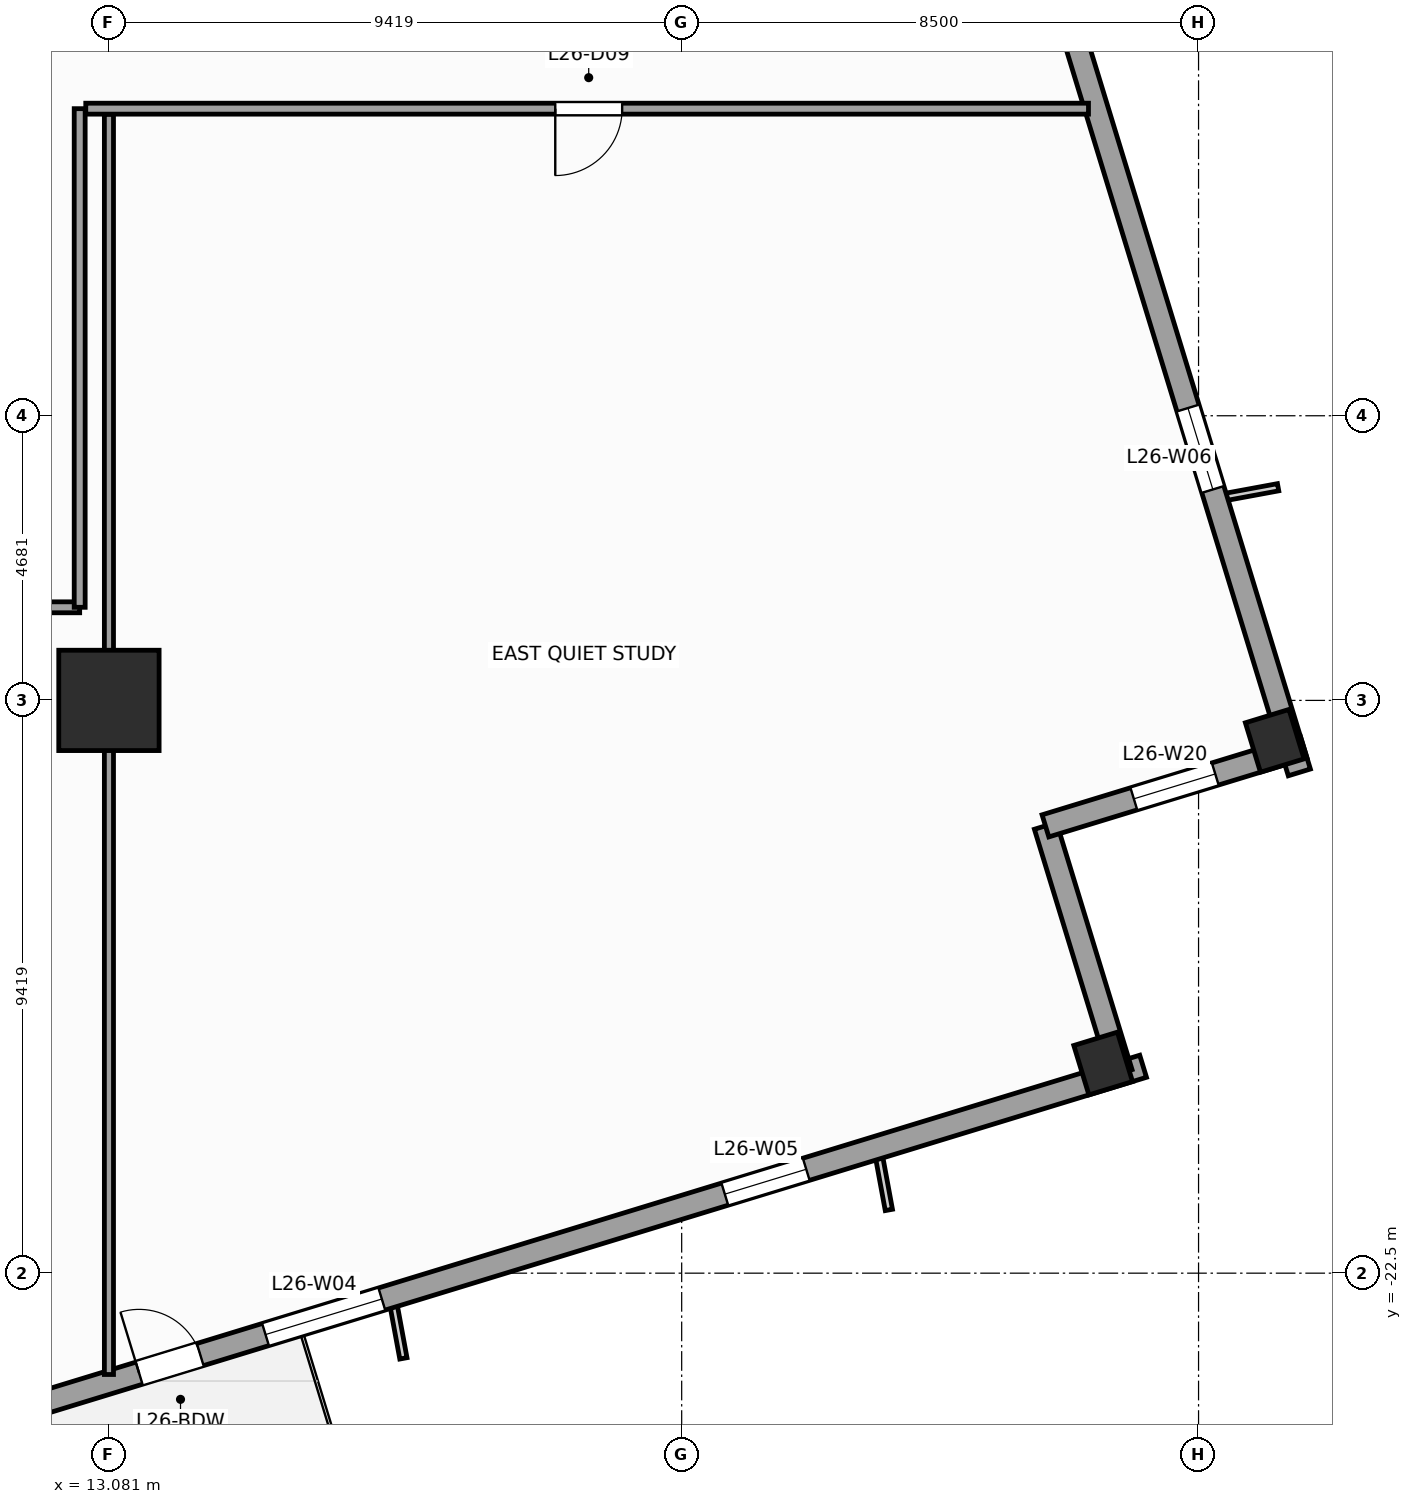
"""IFC4 building model, lengths in metres.
Left out: names, types, materials, properties, quantities, classifications, styles, units other than length and angle.
Written with IfcOpenShell. Run it as: python <this file> out.ifc"""

import sys

from ifc_helpers import new_model, si_unit, direction, frame, frame_2d, origin, origin_2d, place, context, subcontext, project, spatial, rectangle, extrude, source, transform, mapped, element, fill, save


model = new_model("IFC4")
c1 = context("Model", 3, precision=1e-05, world=origin(), true_north=direction((0.0, 1.0)))
c2 = subcontext(c1, "Body", "Model", "MODEL_VIEW")
j1 = project(units=[si_unit("LENGTHUNIT", "METRE"), si_unit("PLANEANGLEUNIT", "RADIAN")], contexts=[c1])
p1 = place(None, origin())
s1 = spatial("IfcSite", under=j1, at=p1, CompositionType="ELEMENT")
p2 = place(p1, origin())
s2 = spatial("IfcBuilding", under=s1, at=p2, CompositionType="ELEMENT")
p3 = place(p2, frame((0.0, 0.0, 111.2)))
s3 = spatial("IfcBuildingStorey", under=s2, at=p3, CompositionType="ELEMENT", Elevation=111.2)
m1 = source(origin(), c2, "Body", "SweptSolid", [
    extrude(rectangle(XDim=1.65, YDim=1.65, at=origin_2d()), origin(), (0.0, 0.0, 1.0), 4.0),
])
p4 = place(p3, frame((13.081, -13.081, 0.0), z_axis=(0.0, 0.0, 1.0), x_axis=(1.0, 0.0, 0.0)))
e1 = element("IfcColumn", 1, at=p4, inside=s3, PredefinedType="COLUMN", context=c2, shape_type="MappedRepresentation", body=[
    mapped(m1, transform((0.0, 0.0, 0.0), scale=1.0)),
])
m2 = source(origin(), c2, "Body", "SweptSolid", [
    extrude(rectangle(XDim=0.75, YDim=0.85, at=origin_2d()), origin(), (0.0, 0.0, 1.0), 4.0),
])
for number, where, z_axis, x_axis in (
    (2, (29.431, -19.052, 0.0), (0.0, 0.0, 1.0), (0.956, 0.292, 0.0)),
    (3, (32.253, -13.746, 0.0), (0.0, 0.0, 1.0), (0.956, 0.292, 0.0)),
):
    element("IfcColumn", number, at=place(p3, frame(where, z_axis=z_axis, x_axis=x_axis)), inside=s3, PredefinedType="COLUMN", context=c2, shape_type="MappedRepresentation", body=[
        mapped(m2, transform((0.0, 0.0, 0.0), scale=1.0)),
    ])
p5 = place(p3, frame((-14.265, -32.658, 0.0), z_axis=(0.0, 0.0, 1.0), x_axis=(0.956304320851, 0.292373127906, 0.0)))
e4 = element("IfcWall", 4, at=p5, inside=s3, PredefinedType="STANDARD", context=c2, shape_type="SweptSolid", body=[
    extrude(rectangle(XDim=46.38, YDim=0.38, at=frame_2d((23.19, 0.0))), origin(), (0.0, 0.0, 1.0), 3.14),
])
p6 = place(p5, frame((29.115, 0.0, 0.0)))
e5 = element("IfcOpeningElement", 5, at=p6, cuts=e4, PredefinedType="OPENING", context=c2, shape_type="SweptSolid", body=[
    extrude(rectangle(XDim=1.05, YDim=2.25, at=frame_2d((0.525, 1.125))), frame((0.0, 0.2, 0.0), z_axis=(0.0, -1.0, 0.0), x_axis=(1.0, 0.0, 0.0)), (0.0, 0.0, 1.0), 0.4),
])
p7 = place(p5, frame((4.865, 0.0, 0.51)))
e6 = element("IfcOpeningElement", 6, at=p7, cuts=e4, PredefinedType="OPENING", context=c2, shape_type="SweptSolid", body=[
    extrude(rectangle(XDim=1.4, YDim=2.4, at=frame_2d((0.7, 1.2))), frame((0.0, 0.2, 0.0), z_axis=(0.0, -1.0, 0.0), x_axis=(1.0, 0.0, 0.0)), (0.0, 0.0, 1.0), 0.4),
])
p8 = place(p5, frame((10.95, 0.0, 0.51)))
e7 = element("IfcOpeningElement", 7, at=p8, cuts=e4, PredefinedType="OPENING", context=c2, shape_type="SweptSolid", body=[
    extrude(rectangle(XDim=2.0, YDim=2.4, at=frame_2d((1.0, 1.2))), frame((0.0, 0.2, 0.0), z_axis=(0.0, -1.0, 0.0), x_axis=(1.0, 0.0, 0.0)), (0.0, 0.0, 1.0), 0.4),
])
p9 = place(p5, frame((20.512, 0.0, 0.51)))
e8 = element("IfcOpeningElement", 8, at=p9, cuts=e4, PredefinedType="OPENING", context=c2, shape_type="SweptSolid", body=[
    extrude(rectangle(XDim=2.0, YDim=2.4, at=frame_2d((1.0, 1.2))), frame((0.0, 0.2, 0.0), z_axis=(0.0, -1.0, 0.0), x_axis=(1.0, 0.0, 0.0)), (0.0, 0.0, 1.0), 0.4),
])
p10 = place(p5, frame((31.288, 0.0, 0.51)))
e9 = element("IfcOpeningElement", 9, at=p10, cuts=e4, PredefinedType="OPENING", context=c2, shape_type="SweptSolid", body=[
    extrude(rectangle(XDim=2.0, YDim=2.4, at=frame_2d((1.0, 1.2))), frame((0.0, 0.2, 0.0), z_axis=(0.0, -1.0, 0.0), x_axis=(1.0, 0.0, 0.0)), (0.0, 0.0, 1.0), 0.4),
])
p11 = place(p5, frame((39.187, 0.0, 0.51)))
e10 = element("IfcOpeningElement", 10, at=p11, cuts=e4, PredefinedType="OPENING", context=c2, shape_type="SweptSolid", body=[
    extrude(rectangle(XDim=1.4, YDim=2.4, at=frame_2d((0.7, 1.2))), frame((0.0, 0.2, 0.0), z_axis=(0.0, -1.0, 0.0), x_axis=(1.0, 0.0, 0.0)), (0.0, 0.0, 1.0), 0.4),
])
p12 = place(p3, frame((29.725, -19.208, 0.0), z_axis=(0.0, 0.0, 1.0), x_axis=(-0.292345507338, 0.956312764915, 0.0)))
e11 = element("IfcWall", 11, at=p12, inside=s3, PredefinedType="STANDARD", context=c2, shape_type="SweptSolid", body=[
    extrude(rectangle(XDim=4.25, YDim=0.38, at=frame_2d((2.125, 0.0))), origin(), (0.0, 0.0, 1.0), 3.74),
])
p13 = place(p3, frame((28.482, -15.144, 0.0), z_axis=(0.0, 0.0, 1.0), x_axis=(0.956304176051, 0.292373601522, 0.0)))
e12 = element("IfcWall", 12, at=p13, inside=s3, PredefinedType="STANDARD", context=c2, shape_type="SweptSolid", body=[
    extrude(rectangle(XDim=4.44, YDim=0.38, at=frame_2d((2.22, 0.0))), origin(), (0.0, 0.0, 1.0), 3.04),
])
p14 = place(p13, frame((1.52, 0.0, 0.51)))
e13 = element("IfcOpeningElement", 13, at=p14, cuts=e12, PredefinedType="OPENING", context=c2, shape_type="SweptSolid", body=[
    extrude(rectangle(XDim=1.4, YDim=2.4, at=frame_2d((0.7, 1.2))), frame((0.0, 0.2, 0.0), z_axis=(0.0, -1.0, 0.0), x_axis=(1.0, 0.0, 0.0)), (0.0, 0.0, 1.0), 0.4),
])
p15 = place(p3, frame((32.658, -14.265, 0.0), z_axis=(0.0, 0.0, 1.0), x_axis=(-0.292373127906, 0.956304320851, 0.0)))
e14 = element("IfcWall", 14, at=p15, inside=s3, PredefinedType="STANDARD", context=c2, shape_type="SweptSolid", body=[
    extrude(rectangle(XDim=46.38, YDim=0.38, at=frame_2d((23.19, 0.0))), origin(), (0.0, 0.0, 1.0), 3.14),
])
p16 = place(p15, frame((4.865, 0.0, 0.51)))
e15 = element("IfcOpeningElement", 15, at=p16, cuts=e14, PredefinedType="OPENING", context=c2, shape_type="SweptSolid", body=[
    extrude(rectangle(XDim=1.4, YDim=2.4, at=frame_2d((0.7, 1.2))), frame((0.0, 0.2, 0.0), z_axis=(0.0, -1.0, 0.0), x_axis=(1.0, 0.0, 0.0)), (0.0, 0.0, 1.0), 0.4),
])
p17 = place(p15, frame((14.7, 0.0, 0.51)))
e16 = element("IfcOpeningElement", 16, at=p17, cuts=e14, PredefinedType="OPENING", context=c2, shape_type="SweptSolid", body=[
    extrude(rectangle(XDim=2.0, YDim=2.4, at=frame_2d((1.0, 1.2))), frame((0.0, 0.2, 0.0), z_axis=(0.0, -1.0, 0.0), x_axis=(1.0, 0.0, 0.0)), (0.0, 0.0, 1.0), 0.4),
])
p18 = place(p15, frame((20.512, 0.0, 0.51)))
e17 = element("IfcOpeningElement", 17, at=p18, cuts=e14, PredefinedType="OPENING", context=c2, shape_type="SweptSolid", body=[
    extrude(rectangle(XDim=2.0, YDim=2.4, at=frame_2d((1.0, 1.2))), frame((0.0, 0.2, 0.0), z_axis=(0.0, -1.0, 0.0), x_axis=(1.0, 0.0, 0.0)), (0.0, 0.0, 1.0), 0.4),
])
p19 = place(p15, frame((30.538, 0.0, 0.51)))
e18 = element("IfcOpeningElement", 18, at=p19, cuts=e14, PredefinedType="OPENING", context=c2, shape_type="SweptSolid", body=[
    extrude(rectangle(XDim=2.0, YDim=2.4, at=frame_2d((1.0, 1.2))), frame((0.0, 0.2, 0.0), z_axis=(0.0, -1.0, 0.0), x_axis=(1.0, 0.0, 0.0)), (0.0, 0.0, 1.0), 0.4),
])
p20 = place(p15, frame((39.187, 0.0, 0.51)))
e19 = element("IfcOpeningElement", 19, at=p20, cuts=e14, PredefinedType="OPENING", context=c2, shape_type="SweptSolid", body=[
    extrude(rectangle(XDim=1.4, YDim=2.4, at=frame_2d((0.7, 1.2))), frame((0.0, 0.2, 0.0), z_axis=(0.0, -1.0, 0.0), x_axis=(1.0, 0.0, 0.0)), (0.0, 0.0, 1.0), 0.4),
])
p21 = place(p3, frame((1.15, -11.55, 0.0), z_axis=(0.0, 0.0, 1.0), x_axis=(1.0, 0.0, 0.0)))
e20 = element("IfcWall", 20, at=p21, inside=s3, PredefinedType="PARTITIONING", context=c2, shape_type="SweptSolid", body=[
    extrude(rectangle(XDim=11.45, YDim=0.18, at=frame_2d((5.725, 0.0))), origin(), (0.0, 0.0, 1.0), 3.74),
])
p22 = place(p21, frame((5.0, 0.0, 0.0)))
e21 = element("IfcOpeningElement", 21, at=p22, cuts=e20, PredefinedType="OPENING", context=c2, shape_type="SweptSolid", body=[
    extrude(rectangle(XDim=1.1, YDim=2.2, at=frame_2d((0.55, 1.1))), frame((0.0, 0.1, 0.0), z_axis=(0.0, -1.0, 0.0), x_axis=(1.0, 0.0, 0.0)), (0.0, 0.0, 1.0), 0.2),
])
p23 = place(p21, frame((8.736, 0.0, 0.0)))
e22 = element("IfcOpeningElement", 22, at=p23, cuts=e20, PredefinedType="OPENING", context=c2, shape_type="SweptSolid", body=[
    extrude(rectangle(XDim=1.1, YDim=2.2, at=frame_2d((0.55, 1.1))), frame((0.0, 0.1, 0.0), z_axis=(0.0, -1.0, 0.0), x_axis=(1.0, 0.0, 0.0)), (0.0, 0.0, 1.0), 0.2),
])
p24 = place(p3, frame((12.6, -11.55, 0.0), z_axis=(0.0, 0.0, 1.0), x_axis=(0.0, 1.0, 0.0)))
e23 = element("IfcWall", 23, at=p24, inside=s3, PredefinedType="PARTITIONING", context=c2, shape_type="SweptSolid", body=[
    extrude(rectangle(XDim=8.2, YDim=0.18, at=frame_2d((4.1, 0.0))), origin(), (0.0, 0.0, 1.0), 3.74),
])
p25 = place(p3, frame((12.7, -3.35, 0.0), z_axis=(0.0, 0.0, 1.0), x_axis=(1.0, 0.0, 0.0)))
e24 = element("IfcWall", 24, at=p25, inside=s3, PredefinedType="PARTITIONING", context=c2, shape_type="SweptSolid", body=[
    extrude(rectangle(XDim=16.49, YDim=0.18, at=frame_2d((8.245, 0.0))), origin(), (0.0, 0.0, 1.0), 3.74),
])
p26 = place(p25, frame((7.721, 0.0, 0.0)))
e25 = element("IfcOpeningElement", 25, at=p26, cuts=e24, PredefinedType="OPENING", context=c2, shape_type="SweptSolid", body=[
    extrude(rectangle(XDim=1.1, YDim=2.2, at=frame_2d((0.55, 1.1))), frame((0.0, 0.1, 0.0), z_axis=(0.0, -1.0, 0.0), x_axis=(1.0, 0.0, 0.0)), (0.0, 0.0, 1.0), 0.2),
])
p27 = place(p3, frame((13.081, -24.167, 0.0), z_axis=(0.0, 0.0, 1.0), x_axis=(0.0, 1.0, 0.0)))
e26 = element("IfcWall", 26, at=p27, inside=s3, PredefinedType="PARTITIONING", context=c2, shape_type="SweptSolid", body=[
    extrude(rectangle(XDim=20.721, YDim=0.15, at=frame_2d((10.361, 0.0))), origin(), (0.0, 0.0, 1.0), 2.732),
])
m3 = source(origin(), c2, "Body", "SweptSolid", [
    extrude(rectangle(XDim=1.05, YDim=2.25, at=frame_2d((0.525, 1.125))), frame((0.0, 0.025, 0.0), z_axis=(0.0, -1.0, 0.0), x_axis=(1.0, 0.0, 0.0)), (0.0, 0.0, 1.0), 0.05),
])
p28 = place(p6, origin())
e27 = element("IfcDoor", 27, at=p28, inside=s3, OperationType="SINGLE_SWING_LEFT", PredefinedType="DOOR", context=c2, shape_type="MappedRepresentation", body=[
    mapped(m3, transform((0.0, 0.0, 0.0), scale=1.0)),
])
fill(e5, e27)
m4 = source(origin(), c2, "Body", "SweptSolid", [
    extrude(rectangle(XDim=2.0, YDim=2.4, at=frame_2d((1.0, 1.2))), frame((0.0, 0.03, 0.0), z_axis=(0.0, -1.0, 0.0), x_axis=(1.0, 0.0, 0.0)), (0.0, 0.0, 1.0), 0.06),
])
p29 = place(p10, origin())
e28 = element("IfcWindow", 28, at=p29, inside=s3, PartitioningType="SINGLE_PANEL", PredefinedType="WINDOW", context=c2, shape_type="MappedRepresentation", body=[
    mapped(m4, transform((0.0, 0.0, 0.0), scale=1.0)),
])
fill(e9, e28)
m5 = source(origin(), c2, "Body", "SweptSolid", [
    extrude(rectangle(XDim=1.4, YDim=2.4, at=frame_2d((0.7, 1.2))), frame((0.0, 0.03, 0.0), z_axis=(0.0, -1.0, 0.0), x_axis=(1.0, 0.0, 0.0)), (0.0, 0.0, 1.0), 0.06),
])
p30 = place(p11, origin())
e29 = element("IfcWindow", 29, at=p30, inside=s3, PartitioningType="SINGLE_PANEL", PredefinedType="WINDOW", context=c2, shape_type="MappedRepresentation", body=[
    mapped(m5, transform((0.0, 0.0, 0.0), scale=1.0)),
])
fill(e10, e29)
p31 = place(p16, origin())
e30 = element("IfcWindow", 30, at=p31, inside=s3, PartitioningType="SINGLE_PANEL", PredefinedType="WINDOW", context=c2, shape_type="MappedRepresentation", body=[
    mapped(m5, transform((0.0, 0.0, 0.0), scale=1.0)),
])
fill(e15, e30)
p32 = place(p14, origin())
e31 = element("IfcWindow", 31, at=p32, inside=s3, PartitioningType="SINGLE_PANEL", PredefinedType="WINDOW", context=c2, shape_type="MappedRepresentation", body=[
    mapped(m5, transform((0.0, 0.0, 0.0), scale=1.0)),
])
fill(e13, e31)
m6 = source(origin(), c2, "Body", "SweptSolid", [
    extrude(rectangle(XDim=1.1, YDim=2.2, at=frame_2d((0.55, 1.1))), frame((0.0, 0.025, 0.0), z_axis=(0.0, -1.0, 0.0), x_axis=(1.0, 0.0, 0.0)), (0.0, 0.0, 1.0), 0.05),
])
p33 = place(p26, frame((1.1, 0.0, 0.0), z_axis=(0.0, 0.0, 1.0), x_axis=(-1.0, 0.0, 0.0)))
e32 = element("IfcDoor", 32, at=p33, inside=s3, OperationType="SINGLE_SWING_LEFT", PredefinedType="DOOR", context=c2, shape_type="MappedRepresentation", body=[
    mapped(m6, transform((0.0, 0.0, 0.0), scale=1.0)),
])
fill(e25, e32)
save(model, sys.argv[1])
